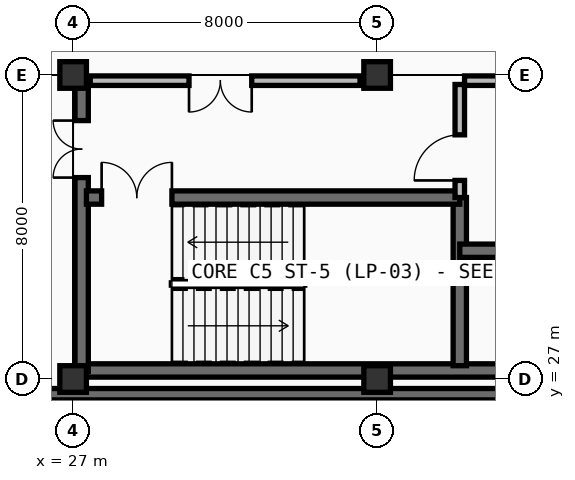
"""IFC4 building model, lengths in metres.
Left out: names, types, materials, properties, quantities, classifications, styles, units other than length and angle.
Written with IfcOpenShell. Run it as: python <this file> out.ifc"""

import sys

from ifc_helpers import new_model, si_unit, direction, frame, frame_2d, origin, origin_2d, place, context, subcontext, project, spatial, rectangle, extrude, element, fill, save


model = new_model("IFC4")
c1 = context("Model", 3, precision=1e-05, world=origin(), true_north=direction((0.0, 1.0)))
c2 = subcontext(c1, "Body", "Model", "MODEL_VIEW")
j1 = project(units=[si_unit("LENGTHUNIT", "METRE"), si_unit("PLANEANGLEUNIT", "RADIAN")], contexts=[c1])
p1 = place(None, origin())
s1 = spatial("IfcSite", under=j1, at=p1, CompositionType="ELEMENT")
p2 = place(p1, origin())
s2 = spatial("IfcBuilding", under=s1, at=p2, CompositionType="ELEMENT")
p3 = place(p2, frame((0.0, 0.0, 23.4)))
s3 = spatial("IfcBuildingStorey", under=s2, at=p3, CompositionType="ELEMENT", Elevation=23.4)
for number, where, z_axis, x_axis in (
    (1, (27.0, 27.0, 0.0), (0.0, 0.0, 1.0), (1.0, 0.0, 0.0)),
    (2, (27.0, 35.0, 0.0), (0.0, 0.0, 1.0), (1.0, 0.0, 0.0)),
    (3, (35.0, 27.0, 0.0), (0.0, 0.0, 1.0), (1.0, 0.0, 0.0)),
    (4, (35.0, 35.0, 0.0), (0.0, 0.0, 1.0), (1.0, 0.0, 0.0)),
):
    element("IfcColumn", number, at=place(p3, frame(where, z_axis=z_axis, x_axis=x_axis)), inside=s3, PredefinedType="COLUMN", context=c2, shape_type="SweptSolid", body=[
        extrude(rectangle(XDim=0.7, YDim=0.7, at=origin_2d()), origin(), (0.0, 0.0, 1.0), 4.5),
    ])
p4 = place(p3, frame((27.2, 27.225, 0.0), z_axis=(0.0, 0.0, 1.0), x_axis=(1.0, 0.0, 0.0)))
e5 = element("IfcWall", 5, at=p4, inside=s3, PredefinedType="SHEAR", context=c2, shape_type="SweptSolid", body=[
    extrude(rectangle(XDim=15.6, YDim=0.35, at=frame_2d((7.8, 0.0))), origin(), (0.0, 0.0, 1.0), 4.1),
])
p5 = place(p3, frame((27.225, 27.2, 0.0), z_axis=(0.0, 0.0, 1.0), x_axis=(0.0, 1.0, 0.0)))
e6 = element("IfcWall", 6, at=p5, inside=s3, PredefinedType="SHEAR", context=c2, shape_type="SweptSolid", body=[
    extrude(rectangle(XDim=7.6, YDim=0.35, at=frame_2d((3.8, 0.0))), origin(), (0.0, 0.0, 1.0), 4.1),
])
p6 = place(p5, frame((5.1, 0.0, 0.0)))
e7 = element("IfcOpeningElement", 7, at=p6, cuts=e6, PredefinedType="OPENING", context=c2, shape_type="SweptSolid", body=[
    extrude(rectangle(XDim=1.5, YDim=2.2, at=frame_2d((0.75, 1.1))), frame((0.0, 0.185, 0.0), z_axis=(0.0, -1.0, 0.0), x_axis=(1.0, 0.0, 0.0)), (0.0, 0.0, 1.0), 0.37),
])
p7 = place(p3, frame((37.175, 27.35, 0.0), z_axis=(0.0, 0.0, 1.0), x_axis=(0.0, 1.0, 0.0)))
e8 = element("IfcWall", 8, at=p7, inside=s3, PredefinedType="SHEAR", context=c2, shape_type="SweptSolid", body=[
    extrude(rectangle(XDim=4.425, YDim=0.35, at=frame_2d((2.212, 0.0))), origin(), (0.0, 0.0, 1.0), 4.1),
])
p8 = place(p3, frame((27.35, 31.775, 0.0), z_axis=(0.0, 0.0, 1.0), x_axis=(1.0, 0.0, 0.0)))
e9 = element("IfcWall", 9, at=p8, inside=s3, PredefinedType="SHEAR", context=c2, shape_type="SweptSolid", body=[
    extrude(rectangle(XDim=9.825, YDim=0.35, at=frame_2d((4.913, 0.0))), origin(), (0.0, 0.0, 1.0), 4.1),
])
p9 = place(p8, frame((0.4, 0.0, 0.0)))
e10 = element("IfcOpeningElement", 10, at=p9, cuts=e9, PredefinedType="OPENING", context=c2, shape_type="SweptSolid", body=[
    extrude(rectangle(XDim=1.85, YDim=2.25, at=frame_2d((0.925, 1.125))), frame((0.0, 0.185, 0.0), z_axis=(0.0, -1.0, 0.0), x_axis=(1.0, 0.0, 0.0)), (0.0, 0.0, 1.0), 0.37),
])
p10 = place(p3, frame((37.175, 30.375, 0.0), z_axis=(0.0, 0.0, 1.0), x_axis=(1.0, 0.0, 0.0)))
e11 = element("IfcWall", 11, at=p10, inside=s3, PredefinedType="SHEAR", context=c2, shape_type="SweptSolid", body=[
    extrude(rectangle(XDim=5.475, YDim=0.35, at=frame_2d((2.737, 0.0))), origin(), (0.0, 0.0, 1.0), 4.1),
])
p11 = place(p10, frame((1.4, 0.0, 0.0)))
e12 = element("IfcOpeningElement", 12, at=p11, cuts=e11, PredefinedType="OPENING", context=c2, shape_type="SweptSolid", body=[
    extrude(rectangle(XDim=1.25, YDim=2.25, at=frame_2d((0.625, 1.125))), frame((0.0, 0.185, 0.0), z_axis=(0.0, -1.0, 0.0), x_axis=(1.0, 0.0, 0.0)), (0.0, 0.0, 1.0), 0.37),
])
p12 = place(p3, frame((37.175, 31.775, 0.0), z_axis=(0.0, 0.0, 1.0), x_axis=(0.0, 1.0, 0.0)))
e13 = element("IfcWall", 13, at=p12, inside=s3, PredefinedType="PARTITIONING", context=c2, shape_type="SweptSolid", body=[
    extrude(rectangle(XDim=2.975, YDim=0.25, at=frame_2d((1.488, 0.0))), origin(), (0.0, 0.0, 1.0), 4.1),
])
p13 = place(p12, frame((0.45, 0.0, 0.0)))
e14 = element("IfcOpeningElement", 14, at=p13, cuts=e13, PredefinedType="OPENING", context=c2, shape_type="SweptSolid", body=[
    extrude(rectangle(XDim=1.2, YDim=2.2, at=frame_2d((0.6, 1.1))), frame((0.0, 0.135, 0.0), z_axis=(0.0, -1.0, 0.0), x_axis=(1.0, 0.0, 0.0)), (0.0, 0.0, 1.0), 0.27),
])
p14 = place(p3, frame((27.45, 34.85, 0.0), z_axis=(0.0, 0.0, 1.0), x_axis=(1.0, 0.0, 0.0)))
e15 = element("IfcWall", 15, at=p14, inside=s3, PredefinedType="PARTITIONING", context=c2, shape_type="SweptSolid", body=[
    extrude(rectangle(XDim=7.1, YDim=0.25, at=frame_2d((3.55, 0.0))), origin(), (0.0, 0.0, 1.0), 3.435),
])
p15 = place(p14, frame((2.6, 0.0, 0.0)))
e16 = element("IfcOpeningElement", 16, at=p15, cuts=e15, PredefinedType="OPENING", context=c2, shape_type="SweptSolid", body=[
    extrude(rectangle(XDim=1.65, YDim=2.25, at=frame_2d((0.825, 1.125))), frame((0.0, 0.135, 0.0), z_axis=(0.0, -1.0, 0.0), x_axis=(1.0, 0.0, 0.0)), (0.0, 0.0, 1.0), 0.27),
])
p16 = place(p3, frame((37.3, 34.85, 0.0), z_axis=(0.0, 0.0, 1.0), x_axis=(1.0, 0.0, 0.0)))
e17 = element("IfcWall", 17, at=p16, inside=s3, PredefinedType="PARTITIONING", context=c2, shape_type="SweptSolid", body=[
    extrude(rectangle(XDim=5.25, YDim=0.25, at=frame_2d((2.625, 0.0))), origin(), (0.0, 0.0, 1.0), 3.435),
])
p17 = place(p16, frame((1.85, 0.0, 0.0)))
e18 = element("IfcOpeningElement", 18, at=p17, cuts=e17, PredefinedType="OPENING", context=c2, shape_type="SweptSolid", body=[
    extrude(rectangle(XDim=1.5, YDim=2.2, at=frame_2d((0.75, 1.1))), frame((0.0, 0.135, 0.0), z_axis=(0.0, -1.0, 0.0), x_axis=(1.0, 0.0, 0.0)), (0.0, 0.0, 1.0), 0.27),
])
p18 = place(p3, frame((22.8, 26.6, 0.0), z_axis=(0.0, 0.0, 1.0), x_axis=(1.0, 0.0, 0.0)))
e19 = element("IfcWall", 19, at=p18, inside=s3, PredefinedType="SHEAR", context=c2, shape_type="SweptSolid", body=[
    extrude(rectangle(XDim=19.8, YDim=0.3, at=frame_2d((9.9, 0.0))), origin(), (0.0, 0.0, 1.0), 4.1),
])
p19 = place(p9, origin())
e20 = element("IfcDoor", 20, at=p19, inside=s3, OperationType="DOUBLE_DOOR_SINGLE_SWING", PredefinedType="DOOR", context=c2, shape_type="SweptSolid", body=[
    extrude(rectangle(XDim=1.85, YDim=2.25, at=frame_2d((0.925, 1.125))), frame((0.0, 0.025, 0.0), z_axis=(0.0, -1.0, 0.0), x_axis=(1.0, 0.0, 0.0)), (0.0, 0.0, 1.0), 0.05),
])
fill(e10, e20)
p20 = place(p13, origin())
e21 = element("IfcDoor", 21, at=p20, inside=s3, OperationType="SINGLE_SWING_LEFT", PredefinedType="DOOR", context=c2, shape_type="SweptSolid", body=[
    extrude(rectangle(XDim=1.2, YDim=2.2, at=frame_2d((0.6, 1.1))), frame((0.0, 0.025, 0.0), z_axis=(0.0, -1.0, 0.0), x_axis=(1.0, 0.0, 0.0)), (0.0, 0.0, 1.0), 0.05),
])
fill(e14, e21)
p21 = place(p15, frame((1.65, 0.0, 0.0), z_axis=(0.0, 0.0, 1.0), x_axis=(-1.0, 0.0, 0.0)))
e22 = element("IfcDoor", 22, at=p21, inside=s3, OperationType="DOUBLE_DOOR_SINGLE_SWING", PredefinedType="DOOR", context=c2, shape_type="SweptSolid", body=[
    extrude(rectangle(XDim=1.65, YDim=2.25, at=frame_2d((0.825, 1.125))), frame((0.0, 0.025, 0.0), z_axis=(0.0, -1.0, 0.0), x_axis=(1.0, 0.0, 0.0)), (0.0, 0.0, 1.0), 0.05),
])
fill(e16, e22)
p22 = place(p6, origin())
e23 = element("IfcDoor", 23, at=p22, inside=s3, OperationType="DOUBLE_DOOR_SINGLE_SWING", PredefinedType="DOOR", context=c2, shape_type="SweptSolid", body=[
    extrude(rectangle(XDim=1.5, YDim=2.2, at=frame_2d((0.75, 1.1))), frame((0.0, 0.025, 0.0), z_axis=(0.0, -1.0, 0.0), x_axis=(1.0, 0.0, 0.0)), (0.0, 0.0, 1.0), 0.05),
])
fill(e7, e23)
save(model, sys.argv[1])
